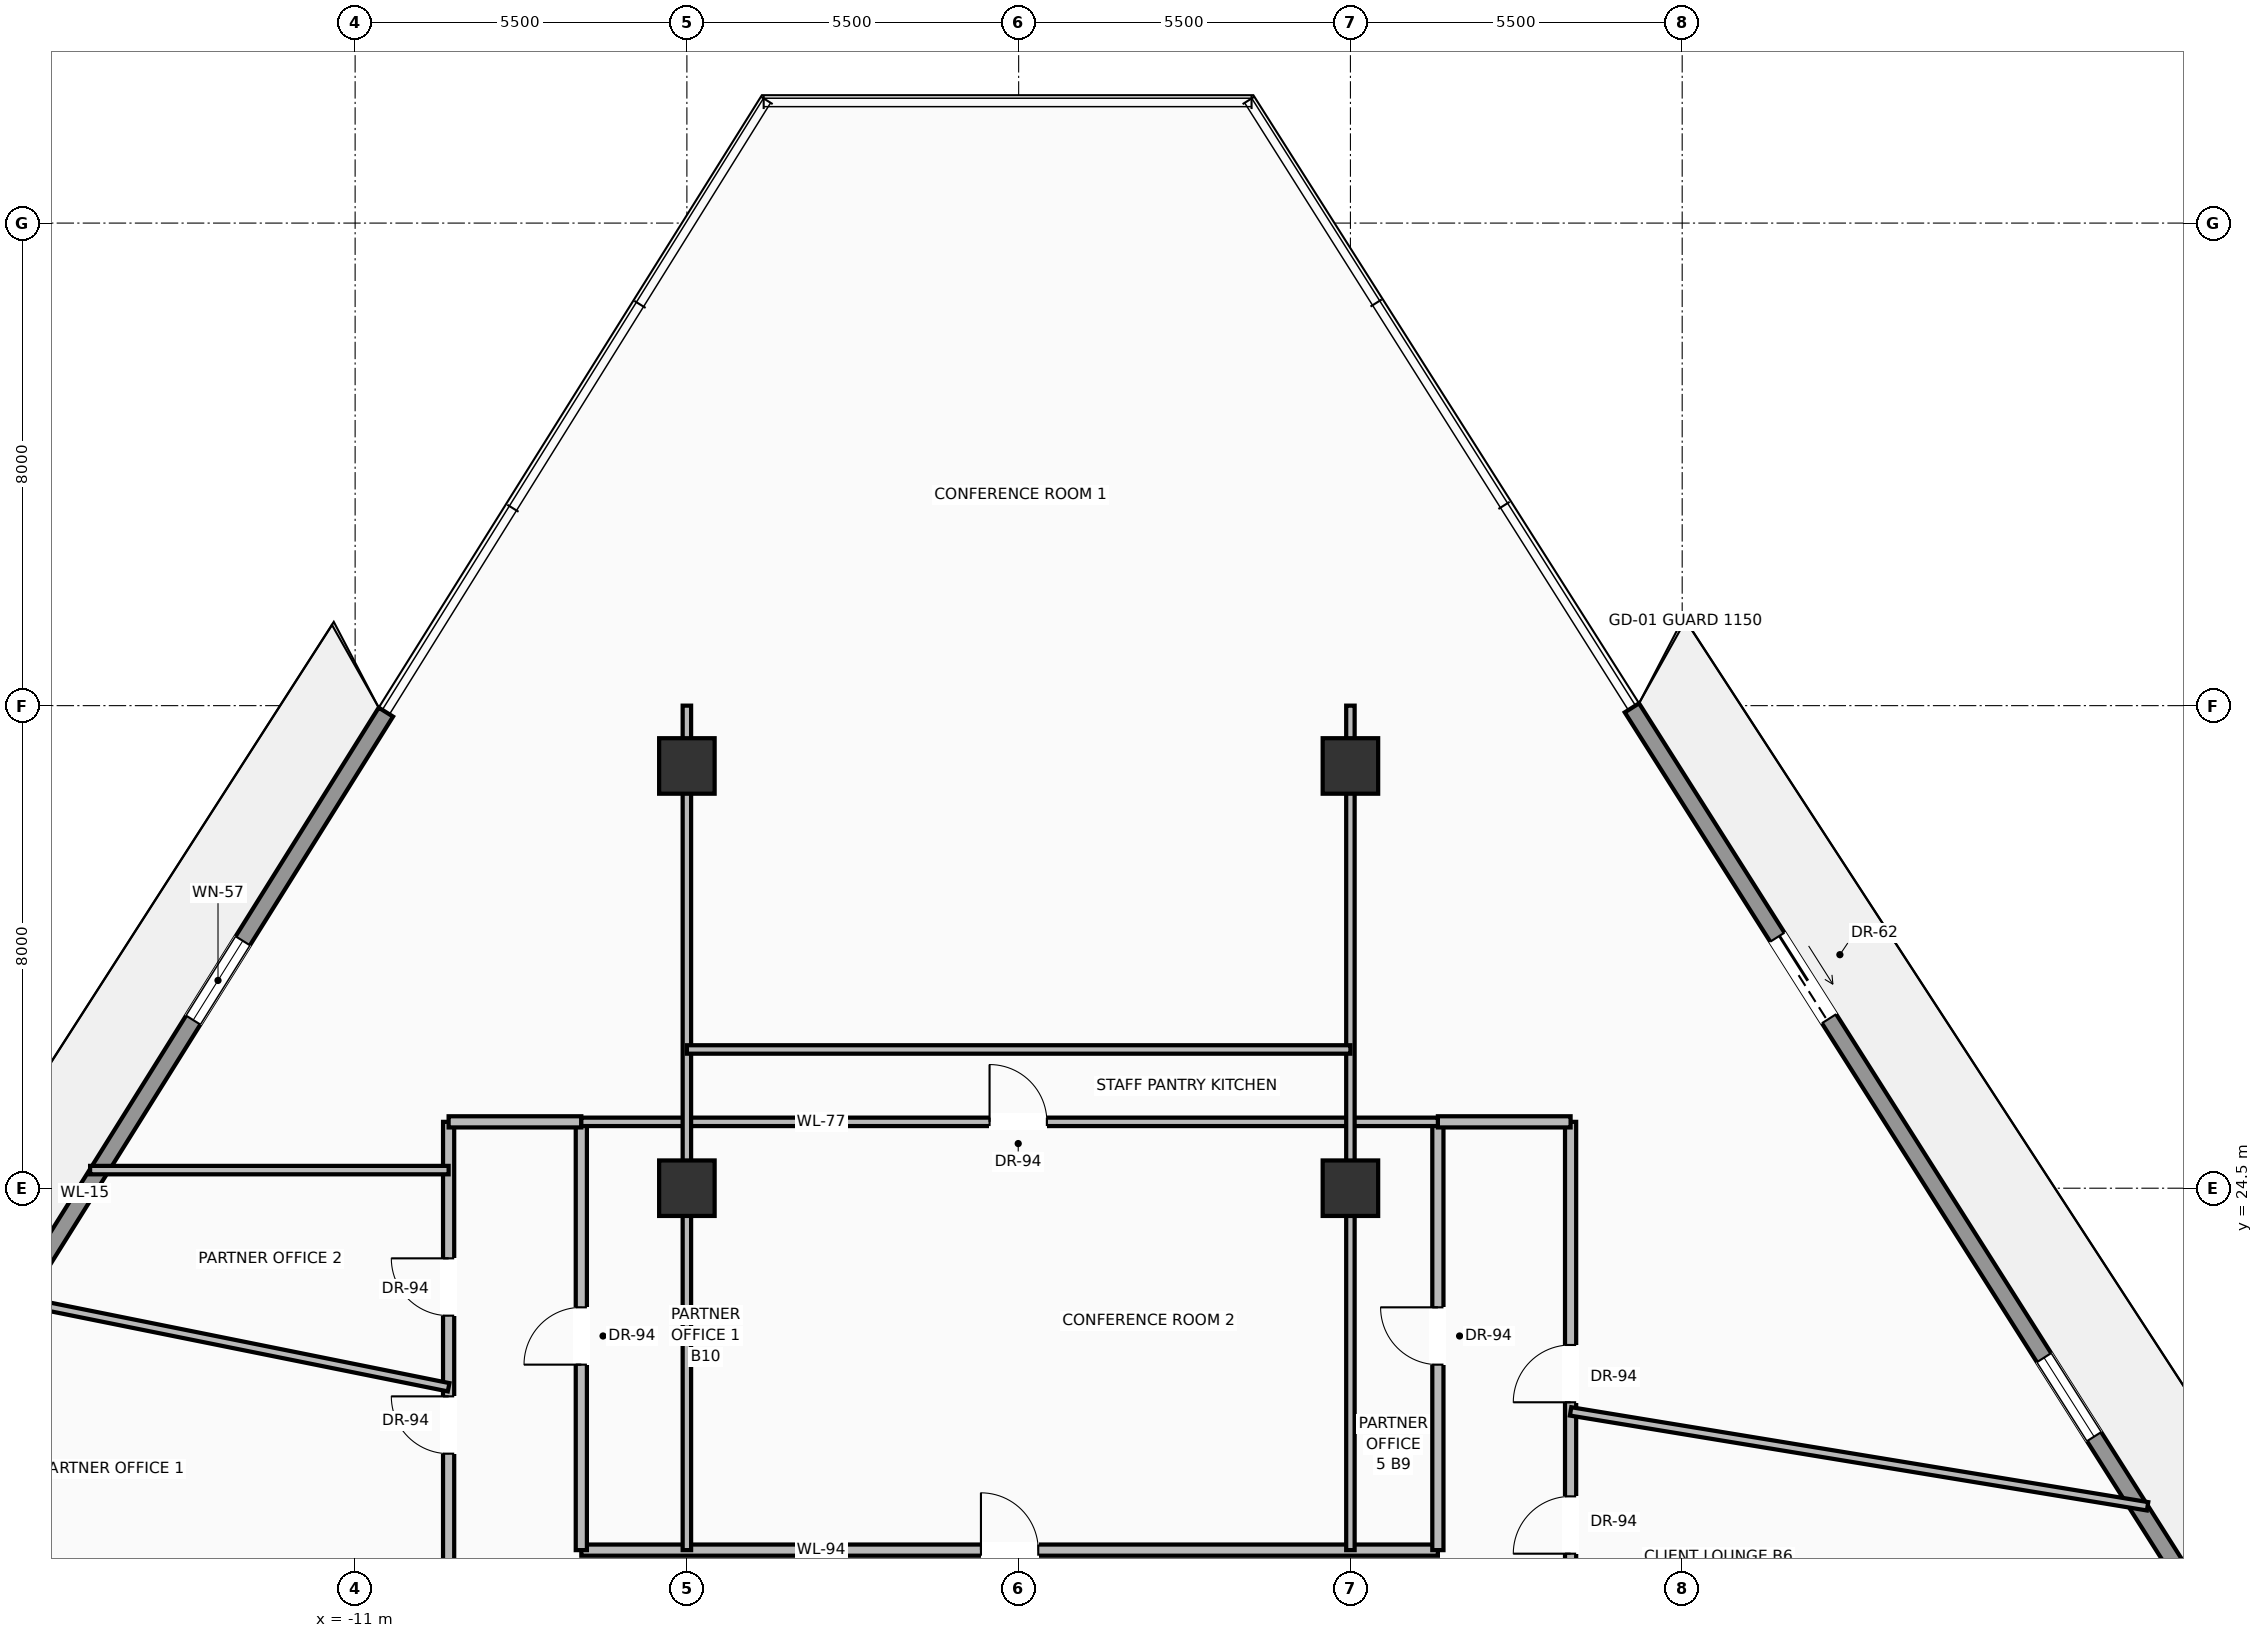
"""IFC4 building model, lengths in metres.
Left out: names, types, materials, properties, quantities, classifications, styles, units other than length and angle.
Written with IfcOpenShell. Run it as: python <this file> out.ifc"""

import sys

from ifc_helpers import new_model, si_unit, direction, frame, frame_2d, origin, origin_2d, place, context, subcontext, project, spatial, rectangle, extrude, source, transform, mapped, element, fill, save


model = new_model("IFC4")
c1 = context("Model", 3, precision=1e-05, world=origin(), true_north=direction((0.0, 1.0)))
c2 = subcontext(c1, "Body", "Model", "MODEL_VIEW")
j1 = project(units=[si_unit("LENGTHUNIT", "METRE"), si_unit("PLANEANGLEUNIT", "RADIAN")], contexts=[c1])
p1 = place(None, origin())
s1 = spatial("IfcSite", under=j1, at=p1, CompositionType="ELEMENT")
p2 = place(p1, origin())
s2 = spatial("IfcBuilding", under=s1, at=p2, CompositionType="ELEMENT")
p3 = place(p2, frame((0.0, 0.0, 178.4)))
s3 = spatial("IfcBuildingStorey", under=s2, at=p3, CompositionType="ELEMENT", Elevation=178.4)
m1 = source(origin(), c2, "Body", "SweptSolid", [
    extrude(rectangle(XDim=0.92, YDim=0.92, at=origin_2d()), origin(), (0.0, 0.0, 1.0), 3.7),
])
for number, where, z_axis, x_axis in (
    (1, (-5.5, 24.5, 0.0), (0.0, 0.0, 1.0), (1.0, 0.0, 0.0)),
    (2, (5.5, 24.5, 0.0), (0.0, 0.0, 1.0), (1.0, 0.0, 0.0)),
    (3, (-5.5, 31.5, 0.0), (0.0, 0.0, 1.0), (1.0, 0.0, 0.0)),
    (4, (5.5, 31.5, 0.0), (0.0, 0.0, 1.0), (1.0, 0.0, 0.0)),
):
    element("IfcColumn", number, at=place(p3, frame(where, z_axis=z_axis, x_axis=x_axis)), inside=s3, PredefinedType="COLUMN", context=c2, shape_type="MappedRepresentation", body=[
        mapped(m1, transform((0.0, 0.0, 0.0), scale=1.0)),
    ])
p4 = place(p3, frame((-20.471, 16.438, 0.0), z_axis=(0.0, 0.0, 1.0), x_axis=(0.530368533609, 0.847767195967, 0.0)))
e5 = element("IfcWall", 5, at=p4, inside=s3, PredefinedType="SOLIDWALL", context=c2, shape_type="SweptSolid", body=[
    extrude(rectangle(XDim=18.82, YDim=0.28, at=frame_2d((9.41, 0.0))), origin(), (0.0, 0.0, 1.0), 3.05),
])
p5 = place(p4, frame((4.517, 0.0, 0.0)))
e6 = element("IfcOpeningElement", 6, at=p5, cuts=e5, PredefinedType="OPENING", context=c2, shape_type="SweptSolid", body=[
    extrude(rectangle(XDim=1.6, YDim=2.35, at=frame_2d((0.8, 1.175))), frame((0.0, 0.15, 0.0), z_axis=(0.0, -1.0, 0.0), x_axis=(1.0, 0.0, 0.0)), (0.0, 0.0, 1.0), 0.3),
])
p6 = place(p4, frame((12.798, 0.0, 0.9)))
e7 = element("IfcOpeningElement", 7, at=p6, cuts=e5, PredefinedType="OPENING", context=c2, shape_type="SweptSolid", body=[
    extrude(rectangle(XDim=1.55, YDim=1.85, at=frame_2d((0.775, 0.925))), frame((0.0, 0.15, 0.0), z_axis=(0.0, -1.0, 0.0), x_axis=(1.0, 0.0, 0.0)), (0.0, 0.0, 1.0), 0.3),
])
p7 = place(p3, frame((10.167, 32.463, 0.0), z_axis=(0.0, 0.0, 1.0), x_axis=(0.535575528783, -0.844487331444, 0.0)))
e8 = element("IfcWall", 8, at=p7, inside=s3, PredefinedType="SOLIDWALL", context=c2, shape_type="SweptSolid", body=[
    extrude(rectangle(XDim=18.76, YDim=0.28, at=frame_2d((9.38, 0.0))), origin(), (0.0, 0.0, 1.0), 3.05),
])
p8 = place(p7, frame((4.502, 0.0, 0.0)))
e9 = element("IfcOpeningElement", 9, at=p8, cuts=e8, PredefinedType="OPENING", context=c2, shape_type="SweptSolid", body=[
    extrude(rectangle(XDim=1.6, YDim=2.35, at=frame_2d((0.8, 1.175))), frame((0.0, 0.15, 0.0), z_axis=(0.0, -1.0, 0.0), x_axis=(1.0, 0.0, 0.0)), (0.0, 0.0, 1.0), 0.3),
])
p9 = place(p7, frame((12.757, 0.0, 0.9)))
e10 = element("IfcOpeningElement", 10, at=p9, cuts=e8, PredefinedType="OPENING", context=c2, shape_type="SweptSolid", body=[
    extrude(rectangle(XDim=1.55, YDim=1.85, at=frame_2d((0.775, 0.925))), frame((0.0, 0.15, 0.0), z_axis=(0.0, -1.0, 0.0), x_axis=(1.0, 0.0, 0.0)), (0.0, 0.0, 1.0), 0.3),
])
p10 = place(p3, frame((-7.25, 18.5, 0.0), z_axis=(0.0, 0.0, 1.0), x_axis=(1.0, 0.0, 0.0)))
e11 = element("IfcWall", 11, at=p10, inside=s3, PredefinedType="PARTITIONING", context=c2, shape_type="SweptSolid", body=[
    extrude(rectangle(XDim=14.2, YDim=0.185, at=frame_2d((7.1, 0.0))), origin(), (0.0, 0.0, 1.0), 2.846),
])
p11 = place(p10, frame((6.625, 0.0, 0.0)))
e12 = element("IfcOpeningElement", 12, at=p11, cuts=e11, PredefinedType="OPENING", context=c2, shape_type="SweptSolid", body=[
    extrude(rectangle(XDim=0.95, YDim=2.2, at=frame_2d((0.475, 1.1))), frame((0.0, 0.103, 0.0), z_axis=(0.0, -1.0, 0.0), x_axis=(1.0, 0.0, 0.0)), (0.0, 0.0, 1.0), 0.205),
])
p12 = place(p3, frame((-7.25, 18.5, 0.0), z_axis=(0.0, 0.0, 1.0), x_axis=(0.0, 1.0, 0.0)))
e13 = element("IfcWall", 13, at=p12, inside=s3, PredefinedType="PARTITIONING", context=c2, shape_type="SweptSolid", body=[
    extrude(rectangle(XDim=7.1, YDim=0.185, at=frame_2d((3.55, 0.0))), origin(), (0.0, 0.0, 1.0), 2.846),
])
p13 = place(p12, frame((3.075, 0.0, 0.0)))
e14 = element("IfcOpeningElement", 14, at=p13, cuts=e13, PredefinedType="OPENING", context=c2, shape_type="SweptSolid", body=[
    extrude(rectangle(XDim=0.95, YDim=2.2, at=frame_2d((0.475, 1.1))), frame((0.0, 0.103, 0.0), z_axis=(0.0, -1.0, 0.0), x_axis=(1.0, 0.0, 0.0)), (0.0, 0.0, 1.0), 0.205),
])
p14 = place(p3, frame((6.95, 18.5, 0.0), z_axis=(0.0, 0.0, 1.0), x_axis=(0.0, 1.0, 0.0)))
e15 = element("IfcWall", 15, at=p14, inside=s3, PredefinedType="PARTITIONING", context=c2, shape_type="SweptSolid", body=[
    extrude(rectangle(XDim=7.1, YDim=0.185, at=frame_2d((3.55, 0.0))), origin(), (0.0, 0.0, 1.0), 2.846),
])
p15 = place(p14, frame((3.075, 0.0, 0.0)))
e16 = element("IfcOpeningElement", 16, at=p15, cuts=e15, PredefinedType="OPENING", context=c2, shape_type="SweptSolid", body=[
    extrude(rectangle(XDim=0.95, YDim=2.2, at=frame_2d((0.475, 1.1))), frame((0.0, 0.103, 0.0), z_axis=(0.0, -1.0, 0.0), x_axis=(1.0, 0.0, 0.0)), (0.0, 0.0, 1.0), 0.205),
])
p16 = place(p3, frame((-9.45, 16.4, 0.0), z_axis=(0.0, 0.0, 1.0), x_axis=(0.0, 1.0, 0.0)))
e17 = element("IfcWall", 17, at=p16, inside=s3, PredefinedType="PARTITIONING", context=c2, shape_type="SweptSolid", body=[
    extrude(rectangle(XDim=9.2, YDim=0.185, at=frame_2d((4.6, 0.0))), origin(), (0.0, 0.0, 1.0), 2.846),
])
p17 = place(p16, frame((3.699, 0.0, 0.0)))
e18 = element("IfcOpeningElement", 18, at=p17, cuts=e17, PredefinedType="OPENING", context=c2, shape_type="SweptSolid", body=[
    extrude(rectangle(XDim=0.95, YDim=2.2, at=frame_2d((0.475, 1.1))), frame((0.0, 0.103, 0.0), z_axis=(0.0, -1.0, 0.0), x_axis=(1.0, 0.0, 0.0)), (0.0, 0.0, 1.0), 0.205),
])
p18 = place(p16, frame((5.987, 0.0, 0.0)))
e19 = element("IfcOpeningElement", 19, at=p18, cuts=e17, PredefinedType="OPENING", context=c2, shape_type="SweptSolid", body=[
    extrude(rectangle(XDim=0.95, YDim=2.2, at=frame_2d((0.475, 1.1))), frame((0.0, 0.103, 0.0), z_axis=(0.0, -1.0, 0.0), x_axis=(1.0, 0.0, 0.0)), (0.0, 0.0, 1.0), 0.205),
])
p19 = place(p3, frame((9.15, 16.4, 0.0), z_axis=(0.0, 0.0, 1.0), x_axis=(0.0, 1.0, 0.0)))
e20 = element("IfcWall", 20, at=p19, inside=s3, PredefinedType="PARTITIONING", context=c2, shape_type="SweptSolid", body=[
    extrude(rectangle(XDim=9.2, YDim=0.185, at=frame_2d((4.6, 0.0))), origin(), (0.0, 0.0, 1.0), 2.846),
])
p20 = place(p19, frame((4.551, 0.0, 0.0)))
e21 = element("IfcOpeningElement", 21, at=p20, cuts=e20, PredefinedType="OPENING", context=c2, shape_type="SweptSolid", body=[
    extrude(rectangle(XDim=0.95, YDim=2.2, at=frame_2d((0.475, 1.1))), frame((0.0, 0.103, 0.0), z_axis=(0.0, -1.0, 0.0), x_axis=(1.0, 0.0, 0.0)), (0.0, 0.0, 1.0), 0.205),
])
p21 = place(p19, frame((2.041, 0.0, 0.0)))
e22 = element("IfcOpeningElement", 22, at=p21, cuts=e20, PredefinedType="OPENING", context=c2, shape_type="SweptSolid", body=[
    extrude(rectangle(XDim=0.95, YDim=2.2, at=frame_2d((0.475, 1.1))), frame((0.0, 0.103, 0.0), z_axis=(0.0, -1.0, 0.0), x_axis=(1.0, 0.0, 0.0)), (0.0, 0.0, 1.0), 0.205),
])
for number, where, z_axis, x_axis in (
    (23, (-9.45, 25.6, 0.0), (0.0, 0.0, 1.0), (1.0, 0.0, 0.0)),
    (24, (6.95, 25.6, 0.0), (0.0, 0.0, 1.0), (1.0, 0.0, 0.0)),
):
    element("IfcWall", number, at=place(p3, frame(where, z_axis=z_axis, x_axis=x_axis)), inside=s3, PredefinedType="PARTITIONING", context=c2, shape_type="SweptSolid", body=[
        extrude(rectangle(XDim=2.2, YDim=0.185, at=frame_2d((1.1, 0.0))), origin(), (0.0, 0.0, 1.0), 3.462),
    ])
p22 = place(p3, frame((-7.25, 25.6, 0.0), z_axis=(0.0, 0.0, 1.0), x_axis=(1.0, 0.0, 0.0)))
e25 = element("IfcWall", 25, at=p22, inside=s3, PredefinedType="PARTITIONING", context=c2, shape_type="SweptSolid", body=[
    extrude(rectangle(XDim=14.2, YDim=0.14, at=frame_2d((7.1, 0.0))), origin(), (0.0, 0.0, 1.0), 3.462),
])
p23 = place(p22, frame((6.768, 0.0, 0.0)))
e26 = element("IfcOpeningElement", 26, at=p23, cuts=e25, PredefinedType="OPENING", context=c2, shape_type="SweptSolid", body=[
    extrude(rectangle(XDim=0.95, YDim=2.2, at=frame_2d((0.475, 1.1))), frame((0.0, 0.08, 0.0), z_axis=(0.0, -1.0, 0.0), x_axis=(1.0, 0.0, 0.0)), (0.0, 0.0, 1.0), 0.16),
])
for number, where, z_axis, x_axis in (
    (27, (-5.5, 18.5, 0.0), (0.0, 0.0, 1.0), (0.0, 1.0, 0.0)),
    (28, (5.5, 18.5, 0.0), (0.0, 0.0, 1.0), (0.0, 1.0, 0.0)),
):
    element("IfcWall", number, at=place(p3, frame(where, z_axis=z_axis, x_axis=x_axis)), inside=s3, PredefinedType="PARTITIONING", context=c2, shape_type="SweptSolid", body=[
        extrude(rectangle(XDim=14.0, YDim=0.14, at=frame_2d((7.0, 0.0))), origin(), (0.0, 0.0, 1.0), 2.846),
    ])
p24 = place(p3, frame((-5.5, 26.8, 0.0), z_axis=(0.0, 0.0, 1.0), x_axis=(1.0, 0.0, 0.0)))
e29 = element("IfcWall", 29, at=p24, inside=s3, PredefinedType="PARTITIONING", context=c2, shape_type="SweptSolid", body=[
    extrude(rectangle(XDim=11.0, YDim=0.14, at=frame_2d((5.5, 0.0))), origin(), (0.0, 0.0, 1.0), 3.462),
])
p25 = place(p3, frame((-16.728, 22.667, 0.0), z_axis=(0.0, 0.0, 1.0), x_axis=(0.980268299124, -0.197671600726, 0.0)))
e30 = element("IfcWall", 30, at=p25, inside=s3, PredefinedType="PARTITIONING", context=c2, shape_type="SweptSolid", body=[
    extrude(rectangle(XDim=7.424, YDim=0.14, at=frame_2d((3.712, 0.0))), origin(), (0.0, 0.0, 1.0), 3.049),
])
p26 = place(p3, frame((-15.394, 24.8, 0.0), z_axis=(0.0, 0.0, 1.0), x_axis=(1.0, 0.0, 0.0)))
e31 = element("IfcWall", 31, at=p26, inside=s3, PredefinedType="PARTITIONING", context=c2, shape_type="SweptSolid", body=[
    extrude(rectangle(XDim=5.944, YDim=0.14, at=frame_2d((2.972, 0.0))), origin(), (0.0, 0.0, 1.0), 3.462),
])
p27 = place(p3, frame((9.15, 20.8, 0.0), z_axis=(0.0, 0.0, 1.0), x_axis=(0.986738202505, -0.162319806916, 0.0)))
e32 = element("IfcWall", 32, at=p27, inside=s3, PredefinedType="PARTITIONING", context=c2, shape_type="SweptSolid", body=[
    extrude(rectangle(XDim=9.694, YDim=0.14, at=frame_2d((4.847, 0.0))), origin(), (0.0, 0.0, 1.0), 3.049),
])
m2 = source(origin(), c2, "Body", "SweptSolid", [
    extrude(rectangle(XDim=1.55, YDim=1.85, at=frame_2d((0.775, 0.925))), frame((0.0, 0.03, 0.0), z_axis=(0.0, -1.0, 0.0), x_axis=(1.0, 0.0, 0.0)), (0.0, 0.0, 1.0), 0.06),
])
p28 = place(p6, origin())
e33 = element("IfcWindow", 33, at=p28, inside=s3, PartitioningType="SINGLE_PANEL", PredefinedType="WINDOW", context=c2, shape_type="MappedRepresentation", body=[
    mapped(m2, transform((0.0, 0.0, 0.0), scale=1.0)),
])
fill(e7, e33)
m3 = source(origin(), c2, "Body", "SweptSolid", [
    extrude(rectangle(XDim=1.6, YDim=2.35, at=frame_2d((0.8, 1.175))), frame((0.0, 0.025, 0.0), z_axis=(0.0, -1.0, 0.0), x_axis=(1.0, 0.0, 0.0)), (0.0, 0.0, 1.0), 0.05),
])
p29 = place(p8, origin())
e34 = element("IfcDoor", 34, at=p29, inside=s3, OperationType="SLIDING_TO_RIGHT", PredefinedType="DOOR", context=c2, shape_type="MappedRepresentation", body=[
    mapped(m3, transform((0.0, 0.0, 0.0), scale=1.0)),
])
fill(e9, e34)
p30 = place(p9, origin())
e35 = element("IfcWindow", 35, at=p30, inside=s3, PartitioningType="SINGLE_PANEL", PredefinedType="WINDOW", context=c2, shape_type="MappedRepresentation", body=[
    mapped(m2, transform((0.0, 0.0, 0.0), scale=1.0)),
])
fill(e10, e35)
m4 = source(origin(), c2, "Body", "SweptSolid", [
    extrude(rectangle(XDim=0.95, YDim=2.2, at=frame_2d((0.475, 1.1))), frame((0.0, 0.025, 0.0), z_axis=(0.0, -1.0, 0.0), x_axis=(1.0, 0.0, 0.0)), (0.0, 0.0, 1.0), 0.05),
])
p31 = place(p11, origin())
e36 = element("IfcDoor", 36, at=p31, inside=s3, OperationType="SINGLE_SWING_LEFT", PredefinedType="DOOR", context=c2, shape_type="MappedRepresentation", body=[
    mapped(m4, transform((0.0, 0.0, 0.0), scale=1.0)),
])
fill(e12, e36)
p32 = place(p17, origin())
e37 = element("IfcDoor", 37, at=p32, inside=s3, OperationType="SINGLE_SWING_RIGHT", PredefinedType="DOOR", context=c2, shape_type="MappedRepresentation", body=[
    mapped(m4, transform((0.0, 0.0, 0.0), scale=1.0)),
])
fill(e18, e37)
p33 = place(p20, origin())
e38 = element("IfcDoor", 38, at=p33, inside=s3, OperationType="SINGLE_SWING_LEFT", PredefinedType="DOOR", context=c2, shape_type="MappedRepresentation", body=[
    mapped(m4, transform((0.0, 0.0, 0.0), scale=1.0)),
])
fill(e21, e38)
p34 = place(p21, origin())
e39 = element("IfcDoor", 39, at=p34, inside=s3, OperationType="SINGLE_SWING_LEFT", PredefinedType="DOOR", context=c2, shape_type="MappedRepresentation", body=[
    mapped(m4, transform((0.0, 0.0, 0.0), scale=1.0)),
])
fill(e22, e39)
p35 = place(p15, origin())
e40 = element("IfcDoor", 40, at=p35, inside=s3, OperationType="SINGLE_SWING_RIGHT", PredefinedType="DOOR", context=c2, shape_type="MappedRepresentation", body=[
    mapped(m4, transform((0.0, 0.0, 0.0), scale=1.0)),
])
fill(e16, e40)
p36 = place(p13, origin())
e41 = element("IfcDoor", 41, at=p36, inside=s3, OperationType="SINGLE_SWING_LEFT", PredefinedType="DOOR", context=c2, shape_type="MappedRepresentation", body=[
    mapped(m4, transform((0.0, 0.0, 0.0), scale=1.0)),
])
fill(e14, e41)
p37 = place(p18, origin())
e42 = element("IfcDoor", 42, at=p37, inside=s3, OperationType="SINGLE_SWING_RIGHT", PredefinedType="DOOR", context=c2, shape_type="MappedRepresentation", body=[
    mapped(m4, transform((0.0, 0.0, 0.0), scale=1.0)),
])
fill(e19, e42)
p38 = place(p23, origin())
e43 = element("IfcDoor", 43, at=p38, inside=s3, OperationType="SINGLE_SWING_LEFT", PredefinedType="DOOR", context=c2, shape_type="MappedRepresentation", body=[
    mapped(m4, transform((0.0, 0.0, 0.0), scale=1.0)),
])
fill(e26, e43)
save(model, sys.argv[1])
